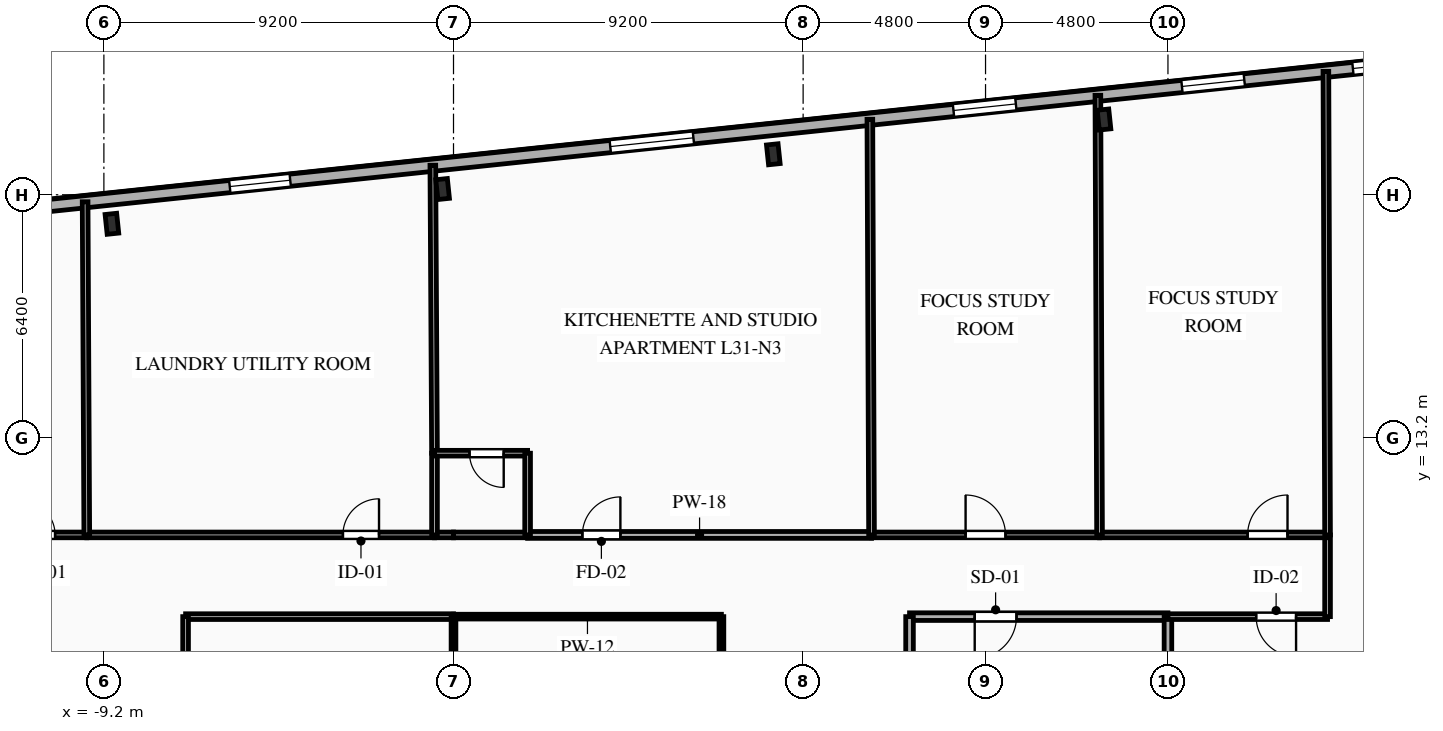
"""IFC4 building model, lengths in metres.
Left out: names, types, materials, properties, quantities, classifications, styles, units other than length and angle.
Written with IfcOpenShell. Run it as: python <this file> out.ifc"""

import sys

from ifc_helpers import new_model, si_unit, direction, frame, frame_2d, origin, origin_2d, place, context, subcontext, project, spatial, rectangle, i_section, extrude, element, fill, save


model = new_model("IFC4")
c1 = context("Model", 3, precision=1e-05, world=origin(), true_north=direction((0.0, 1.0)))
c2 = subcontext(c1, "Body", "Model", "MODEL_VIEW")
j1 = project(units=[si_unit("LENGTHUNIT", "METRE"), si_unit("PLANEANGLEUNIT", "RADIAN")], contexts=[c1])
p1 = place(None, origin())
s1 = spatial("IfcSite", under=j1, at=p1, CompositionType="ELEMENT")
p2 = place(p1, origin())
s2 = spatial("IfcBuilding", under=s1, at=p2, CompositionType="ELEMENT")
p3 = place(p2, frame((0.0, 0.0, 112.5)))
s3 = spatial("IfcBuildingStorey", under=s2, at=p3, CompositionType="ELEMENT", Elevation=112.5)
for number, where, z_axis, x_axis in (
    (1, (17.117, 21.58, 0.0), (0.0, 0.0, 1.0), (0.995, 0.105, 0.0)),
    (2, (8.415, 20.666, 0.0), (0.0, 0.0, 1.0), (0.995, 0.105, 0.0)),
    (3, (-0.287, 19.751, 0.0), (0.0, 0.0, 1.0), (0.995, 0.105, 0.0)),
    (4, (-8.989, 18.836, 0.0), (0.0, 0.0, 1.0), (0.995, 0.105, 0.0)),
):
    element("IfcColumn", number, at=place(p3, frame(where, z_axis=z_axis, x_axis=x_axis)), inside=s3, PredefinedType="COLUMN", context=c2, shape_type="SweptSolid", body=[
        extrude(i_section(OverallWidth=0.306, OverallDepth=0.524, WebThickness=0.021, FlangeThickness=0.04, FilletRadius=0.027, at=origin_2d()), origin(), (0.0, 0.0, 1.0), 3.35),
    ])
p4 = place(p3, frame((-27.107, 17.586, 0.0), z_axis=(0.0, 0.0, 1.0), x_axis=(0.994521628355, 0.104531003701, 0.0)))
e5 = element("IfcWall", 5, at=p4, inside=s3, PredefinedType="SOLIDWALL", context=c2, shape_type="SweptSolid", body=[
    extrude(rectangle(XDim=53.8, YDim=0.32, at=frame_2d((26.9, 0.0))), origin(), (0.0, 0.0, 1.0), 3.045),
])
p5 = place(p4, frame((1.482, 0.0, 0.85)))
e6 = element("IfcOpeningElement", 6, at=p5, cuts=e5, PredefinedType="OPENING", context=c2, shape_type="SweptSolid", body=[
    extrude(rectangle(XDim=1.6, YDim=1.85, at=frame_2d((0.8, 0.925))), frame((0.0, 0.17, 0.0), z_axis=(0.0, -1.0, 0.0), x_axis=(1.0, 0.0, 0.0)), (0.0, 0.0, 1.0), 0.34),
])
p6 = place(p4, frame((6.02, 0.0, 0.85)))
e7 = element("IfcOpeningElement", 7, at=p6, cuts=e5, PredefinedType="OPENING", context=c2, shape_type="SweptSolid", body=[
    extrude(rectangle(XDim=1.65, YDim=1.85, at=frame_2d((0.825, 0.925))), frame((0.0, 0.17, 0.0), z_axis=(0.0, -1.0, 0.0), x_axis=(1.0, 0.0, 0.0)), (0.0, 0.0, 1.0), 0.34),
])
p7 = place(p4, frame((11.584, 0.0, 0.85)))
e8 = element("IfcOpeningElement", 8, at=p7, cuts=e5, PredefinedType="OPENING", context=c2, shape_type="SweptSolid", body=[
    extrude(rectangle(XDim=1.65, YDim=1.85, at=frame_2d((0.825, 0.925))), frame((0.0, 0.17, 0.0), z_axis=(0.0, -1.0, 0.0), x_axis=(1.0, 0.0, 0.0)), (0.0, 0.0, 1.0), 0.34),
])
p8 = place(p4, frame((21.336, 0.0, 0.85)))
e9 = element("IfcOpeningElement", 9, at=p8, cuts=e5, PredefinedType="OPENING", context=c2, shape_type="SweptSolid", body=[
    extrude(rectangle(XDim=1.6, YDim=1.85, at=frame_2d((0.8, 0.925))), frame((0.0, 0.17, 0.0), z_axis=(0.0, -1.0, 0.0), x_axis=(1.0, 0.0, 0.0)), (0.0, 0.0, 1.0), 0.34),
])
p9 = place(p4, frame((31.404, 0.0, 0.85)))
e10 = element("IfcOpeningElement", 10, at=p9, cuts=e5, PredefinedType="OPENING", context=c2, shape_type="SweptSolid", body=[
    extrude(rectangle(XDim=2.2, YDim=1.85, at=frame_2d((1.1, 0.925))), frame((0.0, 0.17, 0.0), z_axis=(0.0, -1.0, 0.0), x_axis=(1.0, 0.0, 0.0)), (0.0, 0.0, 1.0), 0.34),
])
p10 = place(p4, frame((40.486, 0.0, 0.85)))
e11 = element("IfcOpeningElement", 11, at=p10, cuts=e5, PredefinedType="OPENING", context=c2, shape_type="SweptSolid", body=[
    extrude(rectangle(XDim=1.65, YDim=1.85, at=frame_2d((0.825, 0.925))), frame((0.0, 0.17, 0.0), z_axis=(0.0, -1.0, 0.0), x_axis=(1.0, 0.0, 0.0)), (0.0, 0.0, 1.0), 0.34),
])
p11 = place(p4, frame((46.53, 0.0, 0.85)))
e12 = element("IfcOpeningElement", 12, at=p11, cuts=e5, PredefinedType="OPENING", context=c2, shape_type="SweptSolid", body=[
    extrude(rectangle(XDim=1.65, YDim=1.85, at=frame_2d((0.825, 0.925))), frame((0.0, 0.17, 0.0), z_axis=(0.0, -1.0, 0.0), x_axis=(1.0, 0.0, 0.0)), (0.0, 0.0, 1.0), 0.34),
])
p12 = place(p4, frame((51.054, 0.0, 0.85)))
e13 = element("IfcOpeningElement", 13, at=p12, cuts=e5, PredefinedType="OPENING", context=c2, shape_type="SweptSolid", body=[
    extrude(rectangle(XDim=1.65, YDim=1.85, at=frame_2d((0.825, 0.925))), frame((0.0, 0.17, 0.0), z_axis=(0.0, -1.0, 0.0), x_axis=(1.0, 0.0, 0.0)), (0.0, 0.0, 1.0), 0.34),
])
p13 = place(p3, frame((18.8, 8.5, 0.0), z_axis=(0.0, 0.0, 1.0), x_axis=(-1.0, 0.0, 0.0)))
e14 = element("IfcWall", 14, at=p13, inside=s3, PredefinedType="PARTITIONING", context=c2, shape_type="SweptSolid", body=[
    extrude(rectangle(XDim=6.8, YDim=0.2, at=frame_2d((3.4, 0.0))), origin(), (0.0, 0.0, 1.0), 3.045),
])
p14 = place(p13, frame((3.985, 0.0, 0.0)))
e15 = element("IfcOpeningElement", 15, at=p14, cuts=e14, PredefinedType="OPENING", context=c2, shape_type="SweptSolid", body=[
    extrude(rectangle(XDim=1.1, YDim=2.15, at=frame_2d((0.55, 1.075))), frame((0.0, 0.11, 0.0), z_axis=(0.0, -1.0, 0.0), x_axis=(1.0, 0.0, 0.0)), (0.0, 0.0, 1.0), 0.22),
])
p15 = place(p3, frame((12.0, 8.5, 0.0), z_axis=(0.0, 0.0, 1.0), x_axis=(0.0, -1.0, 0.0)))
e16 = element("IfcWall", 16, at=p15, inside=s3, PredefinedType="PARTITIONING", context=c2, shape_type="SweptSolid", body=[
    extrude(rectangle(XDim=2.9, YDim=0.2, at=frame_2d((1.45, 0.0))), origin(), (0.0, 0.0, 1.0), 3.045),
])
p16 = place(p3, frame((18.8, 5.6, 0.0), z_axis=(0.0, 0.0, 1.0), x_axis=(0.0, 1.0, 0.0)))
e17 = element("IfcWall", 17, at=p16, inside=s3, PredefinedType="PARTITIONING", context=c2, shape_type="SweptSolid", body=[
    extrude(rectangle(XDim=2.9, YDim=0.2, at=frame_2d((1.45, 0.0))), origin(), (0.0, 0.0, 1.0), 2.53),
])
p17 = place(p3, frame((-12.0, 10.65, 0.0), z_axis=(0.0, 0.0, 1.0), x_axis=(1.0, 0.0, 0.0)))
e18 = element("IfcWall", 18, at=p17, inside=s3, PredefinedType="PLUMBINGWALL", context=c2, shape_type="SweptSolid", body=[
    extrude(rectangle(XDim=2.35, YDim=0.15, at=frame_2d((1.175, 0.0))), origin(), (0.0, 0.0, 1.0), 3.045),
])
p18 = place(p17, frame((0.616, 0.0, 0.0)))
e19 = element("IfcOpeningElement", 19, at=p18, cuts=e18, PredefinedType="OPENING", context=c2, shape_type="SweptSolid", body=[
    extrude(rectangle(XDim=0.9, YDim=2.1, at=frame_2d((0.45, 1.05))), frame((0.0, 0.085, 0.0), z_axis=(0.0, -1.0, 0.0), x_axis=(1.0, 0.0, 0.0)), (0.0, 0.0, 1.0), 0.17),
])
p19 = place(p3, frame((-9.65, 10.65, 0.0), z_axis=(0.0, 0.0, 1.0), x_axis=(1.0, 0.0, 0.0)))
e20 = element("IfcWall", 20, at=p19, inside=s3, PredefinedType="PARTITIONING", context=c2, shape_type="SweptSolid", body=[
    extrude(rectangle(XDim=9.15, YDim=0.15, at=frame_2d((4.575, 0.0))), origin(), (0.0, 0.0, 1.0), 3.045),
])
p20 = place(p19, frame((6.74, 0.0, 0.0)))
e21 = element("IfcOpeningElement", 21, at=p20, cuts=e20, PredefinedType="OPENING", context=c2, shape_type="SweptSolid", body=[
    extrude(rectangle(XDim=0.95, YDim=2.1, at=frame_2d((0.475, 1.05))), frame((0.0, 0.085, 0.0), z_axis=(0.0, -1.0, 0.0), x_axis=(1.0, 0.0, 0.0)), (0.0, 0.0, 1.0), 0.17),
])
p21 = place(p3, frame((-0.5, 10.65, 0.0), z_axis=(0.0, 0.0, 1.0), x_axis=(1.0, 0.0, 0.0)))
e22 = element("IfcWall", 22, at=p21, inside=s3, PredefinedType="PLUMBINGWALL", context=c2, shape_type="SweptSolid", body=[
    extrude(rectangle(XDim=0.5, YDim=0.15, at=frame_2d((0.25, 0.0))), origin(), (0.0, 0.0, 1.0), 3.045),
])
p22 = place(p3, frame((0.0, 8.5, 0.0), z_axis=(0.0, 0.0, 1.0), x_axis=(-1.0, 0.0, 0.0)))
e23 = element("IfcWall", 23, at=p22, inside=s3, PredefinedType="PARTITIONING", context=c2, shape_type="SweptSolid", body=[
    extrude(rectangle(XDim=7.05, YDim=0.15, at=frame_2d((3.525, 0.0))), origin(), (0.0, 0.0, 1.0), 3.045),
])
p23 = place(p3, frame((23.0, 8.5, 0.0), z_axis=(0.0, 0.0, 1.0), x_axis=(-1.0, 0.0, 0.0)))
e24 = element("IfcWall", 24, at=p23, inside=s3, PredefinedType="PARTITIONING", context=c2, shape_type="SweptSolid", body=[
    extrude(rectangle(XDim=4.2, YDim=0.15, at=frame_2d((2.1, 0.0))), origin(), (0.0, 0.0, 1.0), 3.045),
])
p24 = place(p23, frame((0.829, 0.0, 0.0)))
e25 = element("IfcOpeningElement", 25, at=p24, cuts=e24, PredefinedType="OPENING", context=c2, shape_type="SweptSolid", body=[
    extrude(rectangle(XDim=1.05, YDim=2.15, at=frame_2d((0.525, 1.075))), frame((0.0, 0.085, 0.0), z_axis=(0.0, -1.0, 0.0), x_axis=(1.0, 0.0, 0.0)), (0.0, 0.0, 1.0), 0.17),
])
p25 = place(p3, frame((23.0, 10.65, 0.0), z_axis=(0.0, 0.0, 1.0), x_axis=(0.0, -1.0, 0.0)))
e26 = element("IfcWall", 26, at=p25, inside=s3, PredefinedType="PARTITIONING", context=c2, shape_type="SweptSolid", body=[
    extrude(rectangle(XDim=2.15, YDim=0.15, at=frame_2d((1.075, 0.0))), origin(), (0.0, 0.0, 1.0), 3.045),
])
p26 = place(p3, frame((1.95, 10.65, 0.0), z_axis=(0.0, 0.0, 1.0), x_axis=(1.0, 0.0, 0.0)))
e27 = element("IfcWall", 27, at=p26, inside=s3, PredefinedType="PARTITIONING", context=c2, shape_type="SweptSolid", body=[
    extrude(rectangle(XDim=9.05, YDim=0.18, at=frame_2d((4.525, 0.0))), origin(), (0.0, 0.0, 1.0), 3.045),
])
p27 = place(p26, frame((1.441, 0.0, 0.0)))
e28 = element("IfcOpeningElement", 28, at=p27, cuts=e27, PredefinedType="OPENING", context=c2, shape_type="SweptSolid", body=[
    extrude(rectangle(XDim=1.0, YDim=2.15, at=frame_2d((0.5, 1.075))), frame((0.0, 0.1, 0.0), z_axis=(0.0, -1.0, 0.0), x_axis=(1.0, 0.0, 0.0)), (0.0, 0.0, 1.0), 0.2),
])
p28 = place(p3, frame((0.0, 10.65, 0.0), z_axis=(0.0, 0.0, 1.0), x_axis=(1.0, 0.0, 0.0)))
e29 = element("IfcWall", 29, at=p28, inside=s3, PredefinedType="PLUMBINGWALL", context=c2, shape_type="SweptSolid", body=[
    extrude(rectangle(XDim=1.95, YDim=0.15, at=frame_2d((0.975, 0.0))), origin(), (0.0, 0.0, 1.0), 3.045),
])
p29 = place(p3, frame((11.0, 10.65, 0.0), z_axis=(0.0, 0.0, 1.0), x_axis=(1.0, 0.0, 0.0)))
e30 = element("IfcWall", 30, at=p29, inside=s3, PredefinedType="PARTITIONING", context=c2, shape_type="SweptSolid", body=[
    extrude(rectangle(XDim=6.0, YDim=0.15, at=frame_2d((3.0, 0.0))), origin(), (0.0, 0.0, 1.0), 3.045),
])
p30 = place(p29, frame((2.475, 0.0, 0.0)))
e31 = element("IfcOpeningElement", 31, at=p30, cuts=e30, PredefinedType="OPENING", context=c2, shape_type="SweptSolid", body=[
    extrude(rectangle(XDim=1.05, YDim=2.15, at=frame_2d((0.525, 1.075))), frame((0.0, 0.085, 0.0), z_axis=(0.0, -1.0, 0.0), x_axis=(1.0, 0.0, 0.0)), (0.0, 0.0, 1.0), 0.17),
])
p31 = place(p3, frame((17.0, 10.65, 0.0), z_axis=(0.0, 0.0, 1.0), x_axis=(1.0, 0.0, 0.0)))
e32 = element("IfcWall", 32, at=p31, inside=s3, PredefinedType="PARTITIONING", context=c2, shape_type="SweptSolid", body=[
    extrude(rectangle(XDim=6.0, YDim=0.15, at=frame_2d((3.0, 0.0))), origin(), (0.0, 0.0, 1.0), 3.045),
])
p32 = place(p31, frame((3.896, 0.0, 0.0)))
e33 = element("IfcOpeningElement", 33, at=p32, cuts=e32, PredefinedType="OPENING", context=c2, shape_type="SweptSolid", body=[
    extrude(rectangle(XDim=1.05, YDim=2.15, at=frame_2d((0.525, 1.075))), frame((0.0, 0.085, 0.0), z_axis=(0.0, -1.0, 0.0), x_axis=(1.0, 0.0, 0.0)), (0.0, 0.0, 1.0), 0.17),
])
p33 = place(p3, frame((7.05, 8.5, 0.0), z_axis=(0.0, 0.0, 1.0), x_axis=(-1.0, 0.0, 0.0)))
e34 = element("IfcWall", 34, at=p33, inside=s3, PredefinedType="PARTITIONING", context=c2, shape_type="SweptSolid", body=[
    extrude(rectangle(XDim=7.05, YDim=0.125, at=frame_2d((3.525, 0.0))), origin(), (0.0, 0.0, 1.0), 3.045),
])
p34 = place(p3, frame((-7.05, 8.5, 0.0), z_axis=(0.0, 0.0, 1.0), x_axis=(0.0, -1.0, 0.0)))
e35 = element("IfcWall", 35, at=p34, inside=s3, PredefinedType="PARTITIONING", context=c2, shape_type="SweptSolid", body=[
    extrude(rectangle(XDim=14.1, YDim=0.15, at=frame_2d((7.05, 0.0))), origin(), (0.0, 0.0, 1.0), 3.045),
])
p35 = place(p34, frame((8.074, 0.0, 0.0)))
e36 = element("IfcOpeningElement", 36, at=p35, cuts=e35, PredefinedType="OPENING", context=c2, shape_type="SweptSolid", body=[
    extrude(rectangle(XDim=0.95, YDim=2.1, at=frame_2d((0.475, 1.05))), frame((0.0, 0.085, 0.0), z_axis=(0.0, -1.0, 0.0), x_axis=(1.0, 0.0, 0.0)), (0.0, 0.0, 1.0), 0.17),
])
p36 = place(p3, frame((7.05, -5.6, 0.0), z_axis=(0.0, 0.0, 1.0), x_axis=(0.0, 1.0, 0.0)))
e37 = element("IfcWall", 37, at=p36, inside=s3, PredefinedType="PARTITIONING", context=c2, shape_type="SweptSolid", body=[
    extrude(rectangle(XDim=14.1, YDim=0.125, at=frame_2d((7.05, 0.0))), origin(), (0.0, 0.0, 1.0), 3.045),
])
p37 = place(p36, frame((5.076, 0.0, 0.0)))
e38 = element("IfcOpeningElement", 38, at=p37, cuts=e37, PredefinedType="OPENING", context=c2, shape_type="SweptSolid", body=[
    extrude(rectangle(XDim=0.95, YDim=2.1, at=frame_2d((0.475, 1.05))), frame((0.0, 0.073, 0.0), z_axis=(0.0, -1.0, 0.0), x_axis=(1.0, 0.0, 0.0)), (0.0, 0.0, 1.0), 0.145),
])
p38 = place(p3, frame((23.0, 10.65, 0.0), z_axis=(0.0, 0.0, 1.0), x_axis=(-0.0036027147, 0.999993510202, 0.0)))
e39 = element("IfcWall", 39, at=p38, inside=s3, PredefinedType="PARTITIONING", context=c2, shape_type="SweptSolid", body=[
    extrude(rectangle(XDim=12.198, YDim=0.15, at=frame_2d((6.099, 0.0))), origin(), (0.0, 0.0, 1.0), 3.045),
])
p39 = place(p3, frame((-9.694, 19.416, 0.0), z_axis=(0.0, 0.0, 1.0), x_axis=(0.005013026743, -0.999987434702, 0.0)))
e40 = element("IfcWall", 40, at=p39, inside=s3, PredefinedType="PLUMBINGWALL", context=c2, shape_type="SweptSolid", body=[
    extrude(rectangle(XDim=8.766, YDim=0.15, at=frame_2d((4.383, 0.0))), origin(), (0.0, 0.0, 1.0), 3.045),
])
p40 = place(p3, frame((-0.544, 20.378, 0.0), z_axis=(0.0, 0.0, 1.0), x_axis=(0.005799245221, -0.999983184236, 0.0)))
e41 = element("IfcWall", 41, at=p40, inside=s3, PredefinedType="PARTITIONING", context=c2, shape_type="SweptSolid", body=[
    extrude(rectangle(XDim=7.578, YDim=0.15, at=frame_2d((3.789, 0.0))), origin(), (0.0, 0.0, 1.0), 3.045),
])
p41 = place(p3, frame((-0.5, 12.8, 0.0), z_axis=(0.0, 0.0, 1.0), x_axis=(0.0, -1.0, 0.0)))
e42 = element("IfcWall", 42, at=p41, inside=s3, PredefinedType="PLUMBINGWALL", context=c2, shape_type="SweptSolid", body=[
    extrude(rectangle(XDim=2.15, YDim=0.15, at=frame_2d((1.075, 0.0))), origin(), (0.0, 0.0, 1.0), 3.045),
])
p42 = place(p3, frame((1.95, 12.8, 0.0), z_axis=(0.0, 0.0, 1.0), x_axis=(-1.0, 0.0, 0.0)))
e43 = element("IfcWall", 43, at=p42, inside=s3, PredefinedType="PLUMBINGWALL", context=c2, shape_type="SweptSolid", body=[
    extrude(rectangle(XDim=2.45, YDim=0.15, at=frame_2d((1.225, 0.0))), origin(), (0.0, 0.0, 1.0), 3.045),
])
p43 = place(p42, frame((0.629, 0.0, 0.0)))
e44 = element("IfcOpeningElement", 44, at=p43, cuts=e43, PredefinedType="OPENING", context=c2, shape_type="SweptSolid", body=[
    extrude(rectangle(XDim=0.9, YDim=2.1, at=frame_2d((0.45, 1.05))), frame((0.0, 0.085, 0.0), z_axis=(0.0, -1.0, 0.0), x_axis=(1.0, 0.0, 0.0)), (0.0, 0.0, 1.0), 0.17),
])
p44 = place(p3, frame((1.95, 10.65, 0.0), z_axis=(0.0, 0.0, 1.0), x_axis=(0.0, 1.0, 0.0)))
e45 = element("IfcWall", 45, at=p44, inside=s3, PredefinedType="PLUMBINGWALL", context=c2, shape_type="SweptSolid", body=[
    extrude(rectangle(XDim=2.15, YDim=0.15, at=frame_2d((1.075, 0.0))), origin(), (0.0, 0.0, 1.0), 3.045),
])
p45 = place(p3, frame((10.956, 21.586, 0.0), z_axis=(0.0, 0.0, 1.0), x_axis=(0.004018183473, -0.999991927068, 0.0)))
e46 = element("IfcWall", 46, at=p45, inside=s3, PredefinedType="PARTITIONING", context=c2, shape_type="SweptSolid", body=[
    extrude(rectangle(XDim=10.937, YDim=0.15, at=frame_2d((5.468, 0.0))), origin(), (0.0, 0.0, 1.0), 3.045),
])
p46 = place(p3, frame((16.956, 22.217, 0.0), z_axis=(0.0, 0.0, 1.0), x_axis=(0.003799124105, -0.999992783302, 0.0)))
e47 = element("IfcWall", 47, at=p46, inside=s3, PredefinedType="PARTITIONING", context=c2, shape_type="SweptSolid", body=[
    extrude(rectangle(XDim=11.567, YDim=0.15, at=frame_2d((5.784, 0.0))), origin(), (0.0, 0.0, 1.0), 2.53),
])
p47 = place(p3, frame((0.0, 8.5, 0.0), z_axis=(0.0, 0.0, 1.0), x_axis=(0.0, -1.0, 0.0)))
e48 = element("IfcWall", 48, at=p47, inside=s3, PredefinedType="PARTITIONING", context=c2, shape_type="SweptSolid", body=[
    extrude(rectangle(XDim=14.1, YDim=0.125, at=frame_2d((7.05, 0.0))), origin(), (0.0, 0.0, 1.0), 3.045),
])
p48 = place(p8, origin())
e49 = element("IfcWindow", 49, at=p48, inside=s3, PartitioningType="SINGLE_PANEL", PredefinedType="WINDOW", context=c2, shape_type="SweptSolid", body=[
    extrude(rectangle(XDim=1.6, YDim=1.85, at=frame_2d((0.8, 0.925))), frame((0.0, 0.03, 0.0), z_axis=(0.0, -1.0, 0.0), x_axis=(1.0, 0.0, 0.0)), (0.0, 0.0, 1.0), 0.06),
])
fill(e9, e49)
p49 = place(p9, origin())
e50 = element("IfcWindow", 50, at=p49, inside=s3, PartitioningType="SINGLE_PANEL", PredefinedType="WINDOW", context=c2, shape_type="SweptSolid", body=[
    extrude(rectangle(XDim=2.2, YDim=1.85, at=frame_2d((1.1, 0.925))), frame((0.0, 0.03, 0.0), z_axis=(0.0, -1.0, 0.0), x_axis=(1.0, 0.0, 0.0)), (0.0, 0.0, 1.0), 0.06),
])
fill(e10, e50)
p50 = place(p10, origin())
e51 = element("IfcWindow", 51, at=p50, inside=s3, PartitioningType="SINGLE_PANEL", PredefinedType="WINDOW", context=c2, shape_type="SweptSolid", body=[
    extrude(rectangle(XDim=1.65, YDim=1.85, at=frame_2d((0.825, 0.925))), frame((0.0, 0.03, 0.0), z_axis=(0.0, -1.0, 0.0), x_axis=(1.0, 0.0, 0.0)), (0.0, 0.0, 1.0), 0.06),
])
fill(e11, e51)
p51 = place(p11, origin())
e52 = element("IfcWindow", 52, at=p51, inside=s3, PartitioningType="SINGLE_PANEL", PredefinedType="WINDOW", context=c2, shape_type="SweptSolid", body=[
    extrude(rectangle(XDim=1.65, YDim=1.85, at=frame_2d((0.825, 0.925))), frame((0.0, 0.03, 0.0), z_axis=(0.0, -1.0, 0.0), x_axis=(1.0, 0.0, 0.0)), (0.0, 0.0, 1.0), 0.06),
])
fill(e12, e52)
p52 = place(p12, origin())
e53 = element("IfcWindow", 53, at=p52, inside=s3, PartitioningType="SINGLE_PANEL", PredefinedType="WINDOW", context=c2, shape_type="SweptSolid", body=[
    extrude(rectangle(XDim=1.65, YDim=1.85, at=frame_2d((0.825, 0.925))), frame((0.0, 0.03, 0.0), z_axis=(0.0, -1.0, 0.0), x_axis=(1.0, 0.0, 0.0)), (0.0, 0.0, 1.0), 0.06),
])
fill(e13, e53)
p53 = place(p14, origin())
e54 = element("IfcDoor", 54, at=p53, inside=s3, OperationType="SINGLE_SWING_RIGHT", PredefinedType="DOOR", context=c2, shape_type="SweptSolid", body=[
    extrude(rectangle(XDim=1.1, YDim=2.15, at=frame_2d((0.55, 1.075))), frame((0.0, 0.025, 0.0), z_axis=(0.0, -1.0, 0.0), x_axis=(1.0, 0.0, 0.0)), (0.0, 0.0, 1.0), 0.05),
])
fill(e15, e54)
p54 = place(p18, origin())
e55 = element("IfcDoor", 55, at=p54, inside=s3, OperationType="SINGLE_SWING_LEFT", PredefinedType="DOOR", context=c2, shape_type="SweptSolid", body=[
    extrude(rectangle(XDim=0.9, YDim=2.1, at=frame_2d((0.45, 1.05))), frame((0.0, 0.025, 0.0), z_axis=(0.0, -1.0, 0.0), x_axis=(1.0, 0.0, 0.0)), (0.0, 0.0, 1.0), 0.05),
])
fill(e19, e55)
p55 = place(p20, origin())
e56 = element("IfcDoor", 56, at=p55, inside=s3, OperationType="SINGLE_SWING_RIGHT", PredefinedType="DOOR", context=c2, shape_type="SweptSolid", body=[
    extrude(rectangle(XDim=0.95, YDim=2.1, at=frame_2d((0.475, 1.05))), frame((0.0, 0.025, 0.0), z_axis=(0.0, -1.0, 0.0), x_axis=(1.0, 0.0, 0.0)), (0.0, 0.0, 1.0), 0.05),
])
fill(e21, e56)
p56 = place(p24, origin())
e57 = element("IfcDoor", 57, at=p56, inside=s3, OperationType="SINGLE_SWING_LEFT", PredefinedType="DOOR", context=c2, shape_type="SweptSolid", body=[
    extrude(rectangle(XDim=1.05, YDim=2.15, at=frame_2d((0.525, 1.075))), frame((0.0, 0.025, 0.0), z_axis=(0.0, -1.0, 0.0), x_axis=(1.0, 0.0, 0.0)), (0.0, 0.0, 1.0), 0.05),
])
fill(e25, e57)
p57 = place(p27, origin())
e58 = element("IfcDoor", 58, at=p57, inside=s3, OperationType="SINGLE_SWING_RIGHT", PredefinedType="DOOR", context=c2, shape_type="SweptSolid", body=[
    extrude(rectangle(XDim=1.0, YDim=2.15, at=frame_2d((0.5, 1.075))), frame((0.0, 0.025, 0.0), z_axis=(0.0, -1.0, 0.0), x_axis=(1.0, 0.0, 0.0)), (0.0, 0.0, 1.0), 0.05),
])
fill(e28, e58)
p58 = place(p30, origin())
e59 = element("IfcDoor", 59, at=p58, inside=s3, OperationType="SINGLE_SWING_LEFT", PredefinedType="DOOR", context=c2, shape_type="SweptSolid", body=[
    extrude(rectangle(XDim=1.05, YDim=2.15, at=frame_2d((0.525, 1.075))), frame((0.0, 0.025, 0.0), z_axis=(0.0, -1.0, 0.0), x_axis=(1.0, 0.0, 0.0)), (0.0, 0.0, 1.0), 0.05),
])
fill(e31, e59)
p59 = place(p32, origin())
e60 = element("IfcDoor", 60, at=p59, inside=s3, OperationType="SINGLE_SWING_RIGHT", PredefinedType="DOOR", context=c2, shape_type="SweptSolid", body=[
    extrude(rectangle(XDim=1.05, YDim=2.15, at=frame_2d((0.525, 1.075))), frame((0.0, 0.025, 0.0), z_axis=(0.0, -1.0, 0.0), x_axis=(1.0, 0.0, 0.0)), (0.0, 0.0, 1.0), 0.05),
])
fill(e33, e60)
p60 = place(p43, origin())
e61 = element("IfcDoor", 61, at=p60, inside=s3, OperationType="SINGLE_SWING_LEFT", PredefinedType="DOOR", context=c2, shape_type="SweptSolid", body=[
    extrude(rectangle(XDim=0.9, YDim=2.1, at=frame_2d((0.45, 1.05))), frame((0.0, 0.025, 0.0), z_axis=(0.0, -1.0, 0.0), x_axis=(1.0, 0.0, 0.0)), (0.0, 0.0, 1.0), 0.05),
])
fill(e44, e61)
save(model, sys.argv[1])
